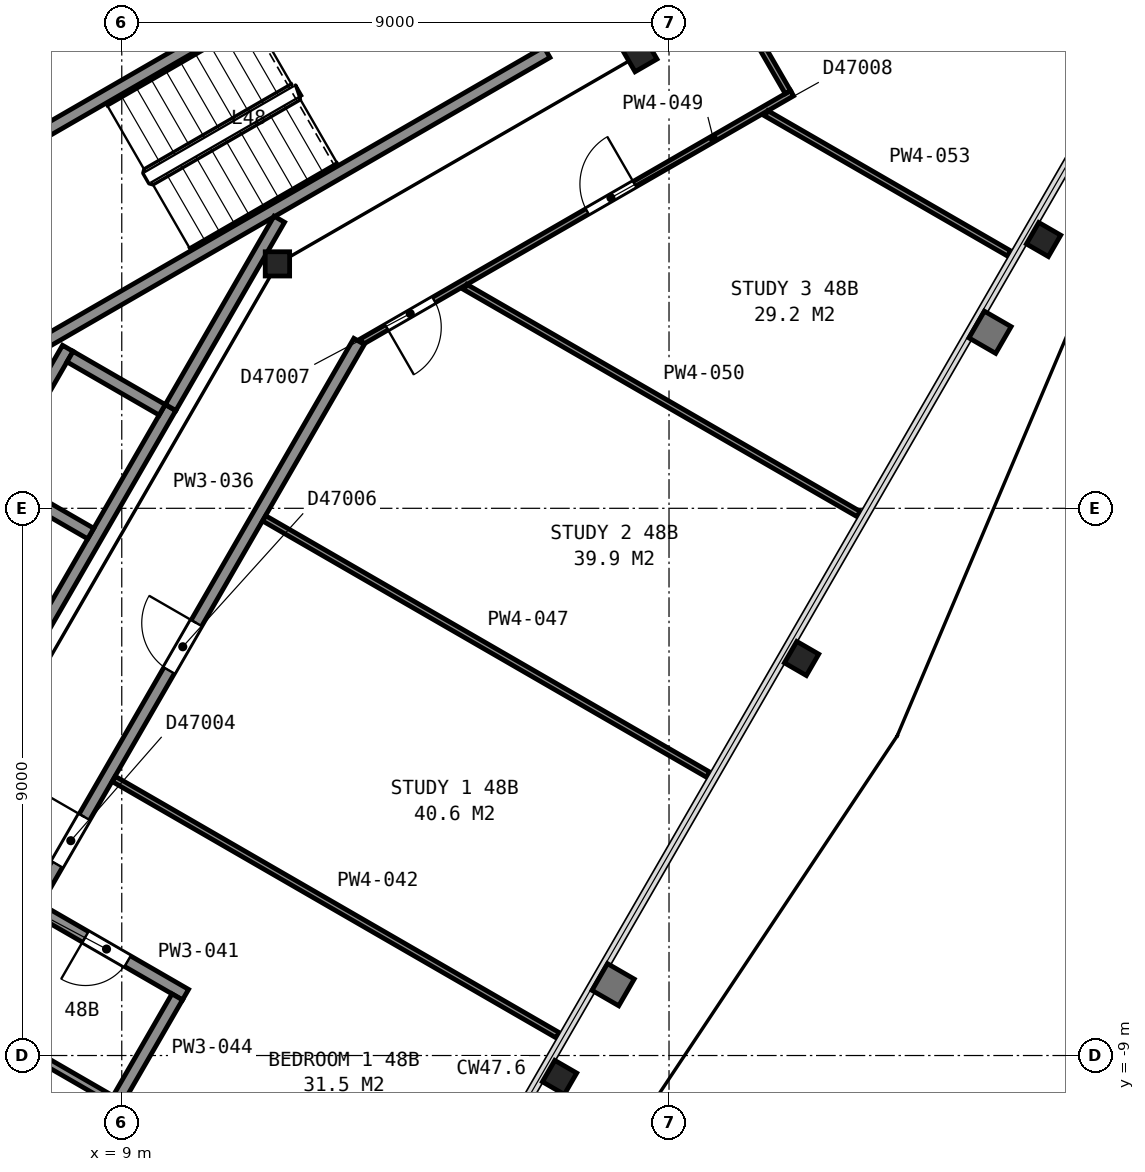
"""IFC4 building model, lengths in metres.
Left out: names, types, materials, properties, quantities, classifications, styles, units other than length and angle.
Written with IfcOpenShell. Run it as: python <this file> out.ifc"""

import sys

from ifc_helpers import new_model, si_unit, direction, frame, frame_2d, origin, origin_2d, place, context, subcontext, project, spatial, rectangle, i_section, extrude, element, fill, save


model = new_model("IFC4")
c1 = context("Model", 3, precision=1e-05, world=origin(), true_north=direction((0.0, 1.0)))
c2 = subcontext(c1, "Body", "Model", "MODEL_VIEW")
j1 = project(units=[si_unit("LENGTHUNIT", "METRE"), si_unit("PLANEANGLEUNIT", "RADIAN")], contexts=[c1])
p1 = place(None, origin())
s1 = spatial("IfcSite", under=j1, at=p1, CompositionType="ELEMENT")
p2 = place(p1, origin())
s2 = spatial("IfcBuilding", under=s1, at=p2, CompositionType="ELEMENT")
p3 = place(p2, frame((0.0, 0.0, 193.2)))
s3 = spatial("IfcBuildingStorey", under=s2, at=p3, CompositionType="ELEMENT", Elevation=193.2)
for number, where, z_axis, x_axis in (
    (1, (16.2, -9.36, 0.0), (0.0, 0.0, 1.0), (-0.5, -0.866, 0.0)),
    (2, (20.18, -2.47, 0.0), (0.0, 0.0, 1.0), (-0.5, -0.866, 0.0)),
    (3, (24.16, 4.42, 0.0), (0.0, 0.0, 1.0), (-0.5, -0.866, 0.0)),
):
    element("IfcColumn", number, at=place(p3, frame(where, z_axis=z_axis, x_axis=x_axis)), inside=s3, PredefinedType="COLUMN", context=c2, shape_type="SweptSolid", body=[
        extrude(i_section(OverallWidth=0.406, OverallDepth=0.417, WebThickness=0.03, FlangeThickness=0.048, FilletRadius=0.015, at=origin_2d()), origin(), (0.0, 0.0, 1.0), 3.7),
    ])
p4 = place(p3, frame((11.56, 4.02, 0.0), z_axis=(0.0, 0.0, 1.0), x_axis=(1.0, 0.0, 0.0)))
e4 = element("IfcColumn", 4, at=p4, inside=s3, PredefinedType="COLUMN", context=c2, shape_type="SweptSolid", body=[
    extrude(i_section(OverallWidth=0.401, OverallDepth=0.399, WebThickness=0.025, FlangeThickness=0.04, FilletRadius=0.015, at=origin_2d()), origin(), (0.0, 0.0, 1.0), 3.7),
])
p5 = place(p3, frame((17.52, 7.46, 0.0), z_axis=(0.0, 0.0, 1.0), x_axis=(0.5, -0.866025403784, 0.0)))
e5 = element("IfcColumn", 5, at=p5, inside=s3, PredefinedType="COLUMN", context=c2, shape_type="SweptSolid", body=[
    extrude(i_section(OverallWidth=0.406, OverallDepth=0.417, WebThickness=0.03, FlangeThickness=0.048, FilletRadius=0.015, at=origin_2d()), origin(), (0.0, 0.0, 1.0), 3.7),
])
p6 = place(p3, frame((15.855, 7.538, 0.0), z_axis=(0.0, 0.0, 1.0), x_axis=(-0.500049511043, 0.865996816683, 0.0)))
e6 = element("IfcWall", 6, at=p6, inside=s3, PredefinedType="PARTITIONING", context=c2, shape_type="SweptSolid", body=[
    extrude(rectangle(XDim=2.8, YDim=0.2, at=frame_2d((1.4, 0.0))), origin(), (0.0, 0.0, 1.0), 3.45),
])
p7 = place(p6, frame((0.85, 0.0, 0.0)))
e7 = element("IfcOpeningElement", 7, at=p7, cuts=e6, PredefinedType="OPENING", context=c2, shape_type="SweptSolid", body=[
    extrude(rectangle(XDim=1.1, YDim=2.1, at=frame_2d((0.55, 1.05))), frame((0.0, 0.11, 0.0), z_axis=(0.0, -1.0, 0.0), x_axis=(1.0, 0.0, 0.0)), (0.0, 0.0, 1.0), 0.22),
])
for number, where, z_axis, x_axis in (
    (8, (6.178, 5.299, 0.0), (0.0, 0.0, 1.0), (0.866, 0.5, 0.0)),
    (9, (7.678, 2.701, 0.0), (0.0, 0.0, 1.0), (0.866, 0.5, 0.0)),
):
    element("IfcWall", number, at=place(p3, frame(where, z_axis=z_axis, x_axis=x_axis)), inside=s3, PredefinedType="PARTITIONING", context=c2, shape_type="SweptSolid", body=[
        extrude(rectangle(XDim=9.6, YDim=0.2, at=frame_2d((4.8, 0.0))), origin(), (0.0, 0.0, 1.0), 3.45),
    ])
p8 = place(p3, frame((7.351, -2.587, 0.0), z_axis=(0.0, 0.0, 1.0), x_axis=(0.500002801628, 0.866023786258, 0.0)))
e10 = element("IfcWall", 10, at=p8, inside=s3, PredefinedType="PARTITIONING", context=c2, shape_type="SweptSolid", body=[
    extrude(rectangle(XDim=4.9, YDim=0.2, at=frame_2d((2.45, 0.0))), origin(), (0.0, 0.0, 1.0), 3.7),
])
p9 = place(p3, frame((5.663, -1.612, 0.0), z_axis=(0.0, 0.0, 1.0), x_axis=(0.49998122708, 0.866036242063, 0.0)))
e11 = element("IfcWall", 11, at=p9, inside=s3, PredefinedType="PARTITIONING", context=c2, shape_type="SweptSolid", body=[
    extrude(rectangle(XDim=4.9, YDim=0.2, at=frame_2d((2.45, 0.0))), origin(), (0.0, 0.0, 1.0), 3.7),
])
p10 = place(p3, frame((9.665, 1.62, 0.0), z_axis=(0.0, 0.0, 1.0), x_axis=(-0.866002029911, 0.500040482552, 0.0)))
e12 = element("IfcWall", 12, at=p10, inside=s3, PredefinedType="PARTITIONING", context=c2, shape_type="SweptSolid", body=[
    extrude(rectangle(XDim=1.75, YDim=0.2, at=frame_2d((0.875, 0.0))), origin(), (0.0, 0.0, 1.0), 3.7),
])
p11 = place(p3, frame((8.49, -0.416, 0.0), z_axis=(0.0, 0.0, 1.0), x_axis=(-0.866036909293, 0.499980071345, 0.0)))
e13 = element("IfcWall", 13, at=p11, inside=s3, PredefinedType="PARTITIONING", context=c2, shape_type="SweptSolid", body=[
    extrude(rectangle(XDim=1.75, YDim=0.2, at=frame_2d((0.875, 0.0))), origin(), (0.0, 0.0, 1.0), 3.7),
])
p12 = place(p3, frame((9.803, 1.658, 0.0), z_axis=(0.0, 0.0, 1.0), x_axis=(0.499943114462, 0.866058244174, 0.0)))
e14 = element("IfcWall", 14, at=p12, inside=s3, PredefinedType="PARTITIONING", context=c2, shape_type="SweptSolid", body=[
    extrude(rectangle(XDim=3.576, YDim=0.2, at=frame_2d((1.788, 0.0))), origin(), (0.0, 0.0, 1.0), 3.45),
])
p13 = place(p3, frame((12.903, 2.745, 0.0), z_axis=(0.0, 0.0, 1.0), x_axis=(-0.499992063946, -0.866029985619, 0.0)))
e15 = element("IfcWall", 15, at=p13, inside=s3, PredefinedType="PARTITIONING", context=c2, shape_type="SweptSolid", body=[
    extrude(rectangle(XDim=12.907, YDim=0.2, at=frame_2d((6.454, 0.0))), origin(), (0.0, 0.0, 1.0), 2.713),
])
p14 = place(p13, frame((9.032, 0.0, 0.0)))
e16 = element("IfcOpeningElement", 16, at=p14, cuts=e15, PredefinedType="OPENING", context=c2, shape_type="SweptSolid", body=[
    extrude(rectangle(XDim=0.9, YDim=2.1, at=frame_2d((0.45, 1.05))), frame((0.0, 0.11, 0.0), z_axis=(0.0, -1.0, 0.0), x_axis=(1.0, 0.0, 0.0)), (0.0, 0.0, 1.0), 0.22),
])
p15 = place(p13, frame((5.349, 0.0, 0.0)))
e17 = element("IfcOpeningElement", 17, at=p15, cuts=e15, PredefinedType="OPENING", context=c2, shape_type="SweptSolid", body=[
    extrude(rectangle(XDim=0.9, YDim=2.1, at=frame_2d((0.45, 1.05))), frame((0.0, 0.11, 0.0), z_axis=(0.0, -1.0, 0.0), x_axis=(1.0, 0.0, 0.0)), (0.0, 0.0, 1.0), 0.22),
])
p16 = place(p3, frame((6.576, -8.419, 0.0), z_axis=(0.0, 0.0, 1.0), x_axis=(0.866048155274, -0.499960591193, 0.0)))
e18 = element("IfcWall", 18, at=p16, inside=s3, PredefinedType="PARTITIONING", context=c2, shape_type="SweptSolid", body=[
    extrude(rectangle(XDim=8.431, YDim=0.125, at=frame_2d((4.215, 0.0))), origin(), (0.0, 0.0, 1.0), 2.713),
])
p17 = place(p3, frame((10.049, -7.999, 0.0), z_axis=(0.0, 0.0, 1.0), x_axis=(-0.866041588165, 0.499971966783, 0.0)))
e19 = element("IfcWall", 19, at=p17, inside=s3, PredefinedType="PARTITIONING", context=c2, shape_type="SweptSolid", body=[
    extrude(rectangle(XDim=2.795, YDim=0.2, at=frame_2d((1.397, 0.0))), origin(), (0.0, 0.0, 1.0), 2.713),
])
p18 = place(p17, frame((1.1, 0.0, 0.0)))
e20 = element("IfcOpeningElement", 20, at=p18, cuts=e19, PredefinedType="OPENING", context=c2, shape_type="SweptSolid", body=[
    extrude(rectangle(XDim=0.8, YDim=2.1, at=frame_2d((0.4, 1.05))), frame((0.0, 0.11, 0.0), z_axis=(0.0, -1.0, 0.0), x_axis=(1.0, 0.0, 0.0)), (0.0, 0.0, 1.0), 0.22),
])
p19 = place(p3, frame((8.869, -4.451, 0.0), z_axis=(0.0, 0.0, 1.0), x_axis=(0.866027858276, -0.499995748672, 0.0)))
e21 = element("IfcWall", 21, at=p19, inside=s3, PredefinedType="PARTITIONING", context=c2, shape_type="SweptSolid", body=[
    extrude(rectangle(XDim=8.429, YDim=0.1, at=frame_2d((4.214, 0.0))), origin(), (0.0, 0.0, 1.0), 2.713),
])
p20 = place(p3, frame((8.946, -9.709, 0.0), z_axis=(0.0, 0.0, 1.0), x_axis=(0.499970304126, 0.866042548026, 0.0)))
e22 = element("IfcWall", 22, at=p20, inside=s3, PredefinedType="PARTITIONING", context=c2, shape_type="SweptSolid", body=[
    extrude(rectangle(XDim=1.933, YDim=0.2, at=frame_2d((0.966, 0.0))), origin(), (0.0, 0.0, 1.0), 2.713),
])
p21 = place(p3, frame((11.343, -0.166, 0.0), z_axis=(0.0, 0.0, 1.0), x_axis=(0.866022557401, -0.500004930048, 0.0)))
e23 = element("IfcWall", 23, at=p21, inside=s3, PredefinedType="PARTITIONING", context=c2, shape_type="SweptSolid", body=[
    extrude(rectangle(XDim=8.429, YDim=0.1, at=frame_2d((4.215, 0.0))), origin(), (0.0, 0.0, 1.0), 2.713),
])
p22 = place(p3, frame((20.023, 6.826, 0.0), z_axis=(0.0, 0.0, 1.0), x_axis=(-0.86608949446, -0.499888975259, 0.0)))
e24 = element("IfcWall", 24, at=p22, inside=s3, PredefinedType="PARTITIONING", context=c2, shape_type="SweptSolid", body=[
    extrude(rectangle(XDim=8.165, YDim=0.1, at=frame_2d((4.083, 0.0))), origin(), (0.0, 0.0, 1.0), 2.713),
])
p23 = place(p22, frame((6.8, 0.0, 0.0)))
e25 = element("IfcOpeningElement", 25, at=p23, cuts=e24, PredefinedType="OPENING", context=c2, shape_type="SweptSolid", body=[
    extrude(rectangle(XDim=0.9, YDim=2.1, at=frame_2d((0.45, 1.05))), frame((0.0, 0.06, 0.0), z_axis=(0.0, -1.0, 0.0), x_axis=(1.0, 0.0, 0.0)), (0.0, 0.0, 1.0), 0.12),
])
p24 = place(p22, frame((2.989, 0.0, 0.0)))
e26 = element("IfcOpeningElement", 26, at=p24, cuts=e24, PredefinedType="OPENING", context=c2, shape_type="SweptSolid", body=[
    extrude(rectangle(XDim=0.9, YDim=2.1, at=frame_2d((0.45, 1.05))), frame((0.0, 0.06, 0.0), z_axis=(0.0, -1.0, 0.0), x_axis=(1.0, 0.0, 0.0)), (0.0, 0.0, 1.0), 0.12),
])
p25 = place(p3, frame((14.651, 3.64, 0.0), z_axis=(0.0, 0.0, 1.0), x_axis=(0.866021145342, -0.500007375767, 0.0)))
e27 = element("IfcWall", 27, at=p25, inside=s3, PredefinedType="PARTITIONING", context=c2, shape_type="SweptSolid", body=[
    extrude(rectangle(XDim=7.467, YDim=0.1, at=frame_2d((3.733, 0.0))), origin(), (0.0, 0.0, 1.0), 2.713),
])
p26 = place(p3, frame((15.928, 13.812, 0.0), z_axis=(0.0, 0.0, 1.0), x_axis=(0.500422653123, -0.865781247337, 0.0)))
e28 = element("IfcWall", 28, at=p26, inside=s3, PredefinedType="PARTITIONING", context=c2, shape_type="SweptSolid", body=[
    extrude(rectangle(XDim=8.047, YDim=0.1, at=frame_2d((4.024, 0.0))), origin(), (0.0, 0.0, 1.0), 2.713),
])
p27 = place(p26, frame((3.4, 0.0, 0.0)))
e29 = element("IfcOpeningElement", 29, at=p27, cuts=e28, PredefinedType="OPENING", context=c2, shape_type="SweptSolid", body=[
    extrude(rectangle(XDim=1.2, YDim=2.1, at=frame_2d((0.6, 1.05))), frame((0.0, 0.06, 0.0), z_axis=(0.0, -1.0, 0.0), x_axis=(1.0, 0.0, 0.0)), (0.0, 0.0, 1.0), 0.12),
])
p28 = place(p3, frame((19.601, 6.496, 0.0), z_axis=(0.0, 0.0, 1.0), x_axis=(0.866056775574, -0.499945658529, 0.0)))
e30 = element("IfcWall", 30, at=p28, inside=s3, PredefinedType="PARTITIONING", context=c2, shape_type="SweptSolid", body=[
    extrude(rectangle(XDim=4.608, YDim=0.1, at=frame_2d((2.304, 0.0))), origin(), (0.0, 0.0, 1.0), 2.713),
])
p29 = place(p14, origin())
e31 = element("IfcDoor", 31, at=p29, inside=s3, OperationType="SINGLE_SWING_LEFT", PredefinedType="DOOR", context=c2, shape_type="SweptSolid", body=[
    extrude(rectangle(XDim=0.9, YDim=2.1, at=frame_2d((0.45, 1.05))), frame((0.0, 0.025, 0.0), z_axis=(0.0, -1.0, 0.0), x_axis=(1.0, 0.0, 0.0)), (0.0, 0.0, 1.0), 0.05),
])
fill(e16, e31)
p30 = place(p15, origin())
e32 = element("IfcDoor", 32, at=p30, inside=s3, OperationType="SINGLE_SWING_LEFT", PredefinedType="DOOR", context=c2, shape_type="SweptSolid", body=[
    extrude(rectangle(XDim=0.9, YDim=2.1, at=frame_2d((0.45, 1.05))), frame((0.0, 0.025, 0.0), z_axis=(0.0, -1.0, 0.0), x_axis=(1.0, 0.0, 0.0)), (0.0, 0.0, 1.0), 0.05),
])
fill(e17, e32)
p31 = place(p18, origin())
e33 = element("IfcDoor", 33, at=p31, inside=s3, OperationType="SINGLE_SWING_RIGHT", PredefinedType="DOOR", context=c2, shape_type="SweptSolid", body=[
    extrude(rectangle(XDim=0.8, YDim=2.1, at=frame_2d((0.4, 1.05))), frame((0.0, 0.025, 0.0), z_axis=(0.0, -1.0, 0.0), x_axis=(1.0, 0.0, 0.0)), (0.0, 0.0, 1.0), 0.05),
])
fill(e20, e33)
p32 = place(p23, origin())
e34 = element("IfcDoor", 34, at=p32, inside=s3, OperationType="SINGLE_SWING_RIGHT", PredefinedType="DOOR", context=c2, shape_type="SweptSolid", body=[
    extrude(rectangle(XDim=0.9, YDim=2.1, at=frame_2d((0.45, 1.05))), frame((0.0, 0.025, 0.0), z_axis=(0.0, -1.0, 0.0), x_axis=(1.0, 0.0, 0.0)), (0.0, 0.0, 1.0), 0.05),
])
fill(e25, e34)
p33 = place(p24, origin())
e35 = element("IfcDoor", 35, at=p33, inside=s3, OperationType="SINGLE_SWING_LEFT", PredefinedType="DOOR", context=c2, shape_type="SweptSolid", body=[
    extrude(rectangle(XDim=0.9, YDim=2.1, at=frame_2d((0.45, 1.05))), frame((0.0, 0.025, 0.0), z_axis=(0.0, -1.0, 0.0), x_axis=(1.0, 0.0, 0.0)), (0.0, 0.0, 1.0), 0.05),
])
fill(e26, e35)
save(model, sys.argv[1])
